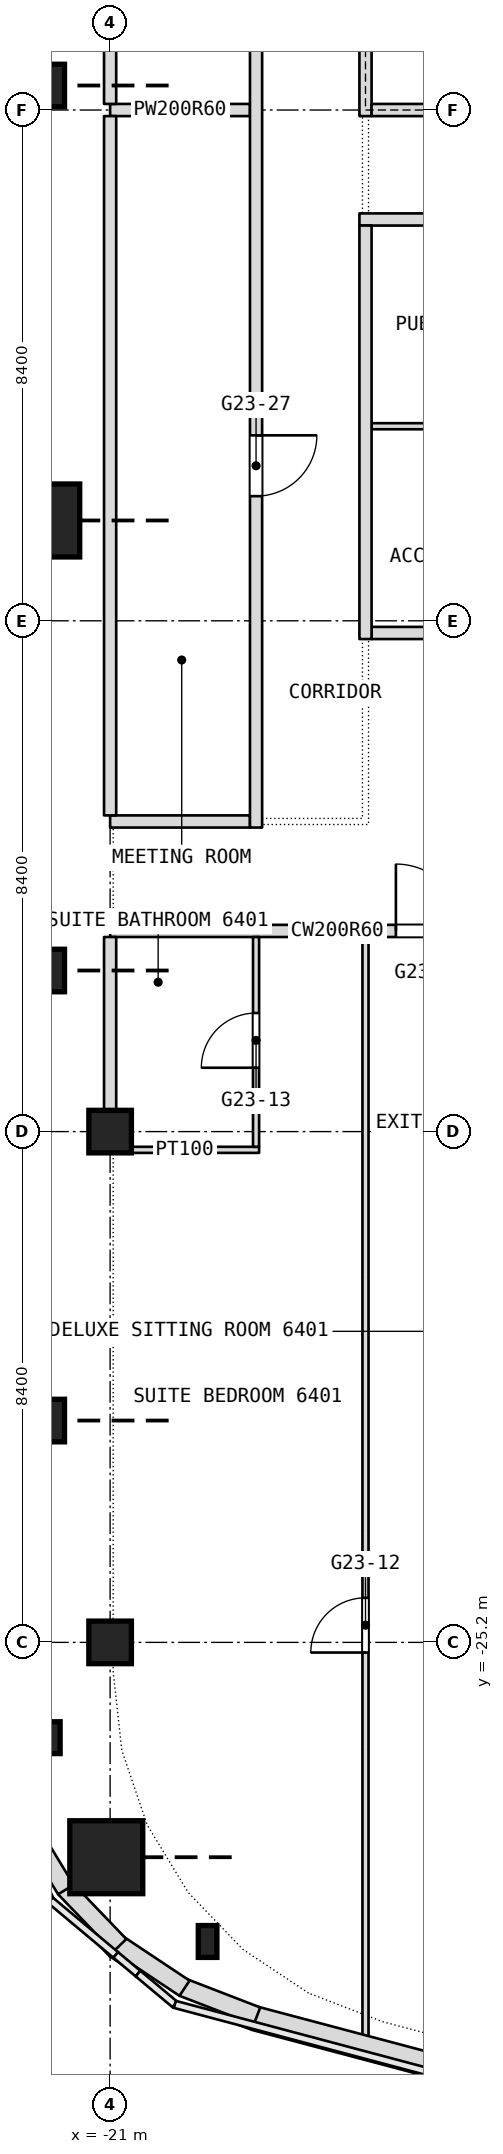
"""IFC4 building model, lengths in metres.
Left out: names, types, materials, properties, quantities, classifications, styles, units other than length and angle.
Written with IfcOpenShell. Run it as: python <this file> out.ifc"""

import sys

from ifc_helpers import new_model, si_unit, direction, frame, frame_2d, origin, origin_2d, place, context, subcontext, project, spatial, rectangle, i_section, extrude, element, fill, save


model = new_model("IFC4")
c1 = context("Model", 3, precision=1e-05, world=origin(), true_north=direction((0.0, 1.0)))
c2 = subcontext(c1, "Body", "Model", "MODEL_VIEW")
j1 = project(units=[si_unit("LENGTHUNIT", "METRE"), si_unit("PLANEANGLEUNIT", "RADIAN")], contexts=[c1])
p1 = place(None, origin())
s1 = spatial("IfcSite", under=j1, at=p1, CompositionType="ELEMENT")
p2 = place(p1, origin())
s2 = spatial("IfcBuilding", under=s1, at=p2, CompositionType="ELEMENT")
p3 = place(p2, frame((0.0, 0.0, 277.7)))
s3 = spatial("IfcBuildingStorey", under=s2, at=p3, CompositionType="ELEMENT", Elevation=277.7)
for number, where, z_axis, x_axis in (
    (1, (-21.0, -25.2, 0.0), (0.0, 0.0, 1.0), (1.0, 0.0, 0.0)),
    (2, (-21.0, -16.8, 0.0), (0.0, 0.0, 1.0), (1.0, 0.0, 0.0)),
):
    element("IfcColumn", number, at=place(p3, frame(where, z_axis=z_axis, x_axis=x_axis)), inside=s3, PredefinedType="COLUMN", context=c2, shape_type="SweptSolid", body=[
        extrude(rectangle(XDim=0.7, YDim=0.7, at=origin_2d()), origin(), (0.0, 0.0, 1.0), 3.34),
    ])
p4 = place(p3, frame((-19.397, -30.119, -0.26), z_axis=(0.0, 0.0, 1.0), x_axis=(1.0, 0.0, 0.0)))
e3 = element("IfcColumn", 3, at=p4, inside=s3, PredefinedType="COLUMN", context=c2, shape_type="SweptSolid", body=[
    extrude(i_section(OverallWidth=0.306, OverallDepth=0.524, WebThickness=0.024, FlangeThickness=0.04, FilletRadius=0.027, at=origin_2d()), origin(), (0.0, 0.0, 1.0), 3.2),
])
p5 = place(p3, frame((-21.058, -28.729, 0.0), z_axis=(0.0, 0.0, 1.0), x_axis=(1.0, 0.0, 0.0)))
e4 = element("IfcColumn", 4, at=p5, inside=s3, PredefinedType="COLUMN", context=c2, shape_type="SweptSolid", body=[
    extrude(i_section(OverallWidth=0.306, OverallDepth=0.524, WebThickness=0.024, FlangeThickness=0.04, FilletRadius=0.027, at=origin_2d()), origin(), (0.0, 0.0, 1.0), 2.94),
])
p6 = place(p3, frame((-21.975, -26.767, -0.26), z_axis=(0.0, 0.0, 1.0), x_axis=(1.0, 0.0, 0.0)))
e5 = element("IfcColumn", 5, at=p6, inside=s3, PredefinedType="COLUMN", context=c2, shape_type="SweptSolid", body=[
    extrude(i_section(OverallWidth=0.306, OverallDepth=0.524, WebThickness=0.024, FlangeThickness=0.04, FilletRadius=0.027, at=origin_2d()), origin(), (0.0, 0.0, 1.0), 3.2),
])
for number, where, z_axis, x_axis in (
    (6, (-22.1, -21.552, 0.0), (0.0, 0.0, 1.0), (1.0, 0.0, 0.0)),
    (7, (-22.1, -14.151, 0.0), (0.0, 0.0, 1.0), (1.0, 0.0, 0.0)),
    (8, (-22.1, -6.75, 0.0), (0.0, 0.0, 1.0), (1.0, 0.0, 0.0)),
    (9, (-22.1, 0.403, 0.0), (0.0, 0.0, 1.0), (1.0, 0.0, 0.0)),
):
    element("IfcColumn", number, at=place(p3, frame(where, z_axis=z_axis, x_axis=x_axis)), inside=s3, PredefinedType="COLUMN", context=c2, shape_type="SweptSolid", body=[
        extrude(i_section(OverallWidth=0.306, OverallDepth=0.524, WebThickness=0.024, FlangeThickness=0.04, FilletRadius=0.027, at=origin_2d()), origin(), (0.0, 0.0, 1.0), 2.94),
    ])
p7 = place(p3, frame((-21.0, -17.1, 0.0), z_axis=(0.0, 0.0, 1.0), x_axis=(1.0, 0.0, 0.0)))
e10 = element("IfcWall", 10, at=p7, inside=s3, PredefinedType="PARTITIONING", context=c2, shape_type="SweptSolid", body=[
    extrude(rectangle(XDim=2.45, YDim=0.1, at=frame_2d((1.225, 0.0))), origin(), (0.0, 0.0, 1.0), 3.34),
])
p8 = place(p3, frame((-21.0, -13.5, 0.0), z_axis=(0.0, 0.0, 1.0), x_axis=(1.0, 0.0, 0.0)))
e11 = element("IfcWall", 11, at=p8, inside=s3, PredefinedType="PARTITIONING", context=c2, shape_type="SweptSolid", body=[
    extrude(rectangle(XDim=6.1, YDim=0.2, at=frame_2d((3.05, 0.0))), origin(), (0.0, 0.0, 1.0), 3.34),
])
p9 = place(p8, frame((4.7, 0.0, 0.0)))
e12 = element("IfcOpeningElement", 12, at=p9, cuts=e11, PredefinedType="OPENING", context=c2, shape_type="SweptSolid", body=[
    extrude(rectangle(XDim=1.1, YDim=2.1, at=frame_2d((0.55, 1.05))), frame((0.0, 0.1, 0.0), z_axis=(0.0, -1.0, 0.0), x_axis=(1.0, 0.0, 0.0)), (0.0, 0.0, 1.0), 0.2),
])
p10 = place(p3, frame((-21.0, -11.7, 0.0), z_axis=(0.0, 0.0, 1.0), x_axis=(1.0, 0.0, 0.0)))
e13 = element("IfcWall", 13, at=p10, inside=s3, PredefinedType="PARTITIONING", context=c2, shape_type="SweptSolid", body=[
    extrude(rectangle(XDim=2.3, YDim=0.2, at=frame_2d((1.15, 0.0))), origin(), (0.0, 0.0, 1.0), 3.34),
])
p11 = place(p3, frame((-16.7, -8.6, 0.0), z_axis=(0.0, 0.0, 1.0), x_axis=(1.0, 0.0, 0.0)))
e14 = element("IfcWall", 14, at=p11, inside=s3, PredefinedType="PARTITIONING", context=c2, shape_type="SweptSolid", body=[
    extrude(rectangle(XDim=8.4, YDim=0.2, at=frame_2d((4.2, 0.0))), origin(), (0.0, 0.0, 1.0), 3.34),
])
p12 = place(p3, frame((-16.7, -5.2, 0.0), z_axis=(0.0, 0.0, 1.0), x_axis=(1.0, 0.0, 0.0)))
e15 = element("IfcWall", 15, at=p12, inside=s3, PredefinedType="PARTITIONING", context=c2, shape_type="SweptSolid", body=[
    extrude(rectangle(XDim=4.2, YDim=0.1, at=frame_2d((2.1, 0.0))), origin(), (0.0, 0.0, 1.0), 3.34),
])
p13 = place(p12, frame((1.55, 0.0, 0.0)))
e16 = element("IfcOpeningElement", 16, at=p13, cuts=e15, PredefinedType="OPENING", context=c2, shape_type="SweptSolid", body=[
    extrude(rectangle(XDim=0.9, YDim=2.1, at=frame_2d((0.45, 1.05))), frame((0.0, 0.05, 0.0), z_axis=(0.0, -1.0, 0.0), x_axis=(1.0, 0.0, 0.0)), (0.0, 0.0, 1.0), 0.1),
])
p14 = place(p3, frame((-16.9, -1.8, 0.0), z_axis=(0.0, 0.0, 1.0), x_axis=(1.0, 0.0, 0.0)))
e17 = element("IfcWall", 17, at=p14, inside=s3, PredefinedType="PARTITIONING", context=c2, shape_type="SweptSolid", body=[
    extrude(rectangle(XDim=33.8, YDim=0.2, at=frame_2d((16.9, 0.0))), origin(), (0.0, 0.0, 1.0), 3.34),
])
p15 = place(p14, frame((1.7, 0.0, 0.0)))
e18 = element("IfcOpeningElement", 18, at=p15, cuts=e17, PredefinedType="OPENING", context=c2, shape_type="SweptSolid", body=[
    extrude(rectangle(XDim=1.0, YDim=2.1, at=frame_2d((0.5, 1.05))), frame((0.0, 0.1, 0.0), z_axis=(0.0, -1.0, 0.0), x_axis=(1.0, 0.0, 0.0)), (0.0, 0.0, 1.0), 0.2),
])
p16 = place(p14, frame((5.9, 0.0, 0.0)))
e19 = element("IfcOpeningElement", 19, at=p16, cuts=e17, PredefinedType="OPENING", context=c2, shape_type="SweptSolid", body=[
    extrude(rectangle(XDim=1.0, YDim=2.1, at=frame_2d((0.5, 1.05))), frame((0.0, 0.1, 0.0), z_axis=(0.0, -1.0, 0.0), x_axis=(1.0, 0.0, 0.0)), (0.0, 0.0, 1.0), 0.2),
])
p17 = place(p14, frame((10.1, 0.0, 0.0)))
e20 = element("IfcOpeningElement", 20, at=p17, cuts=e17, PredefinedType="OPENING", context=c2, shape_type="SweptSolid", body=[
    extrude(rectangle(XDim=1.0, YDim=2.1, at=frame_2d((0.5, 1.05))), frame((0.0, 0.1, 0.0), z_axis=(0.0, -1.0, 0.0), x_axis=(1.0, 0.0, 0.0)), (0.0, 0.0, 1.0), 0.2),
])
p18 = place(p14, frame((16.0, 0.0, 0.0)))
e21 = element("IfcOpeningElement", 21, at=p18, cuts=e17, PredefinedType="OPENING", context=c2, shape_type="SweptSolid", body=[
    extrude(rectangle(XDim=1.8, YDim=2.1, at=frame_2d((0.9, 1.05))), frame((0.0, 0.1, 0.0), z_axis=(0.0, -1.0, 0.0), x_axis=(1.0, 0.0, 0.0)), (0.0, 0.0, 1.0), 0.2),
])
p19 = place(p14, frame((22.7, 0.0, 0.0)))
e22 = element("IfcOpeningElement", 22, at=p19, cuts=e17, PredefinedType="OPENING", context=c2, shape_type="SweptSolid", body=[
    extrude(rectangle(XDim=1.0, YDim=2.1, at=frame_2d((0.5, 1.05))), frame((0.0, 0.1, 0.0), z_axis=(0.0, -1.0, 0.0), x_axis=(1.0, 0.0, 0.0)), (0.0, 0.0, 1.0), 0.2),
])
p20 = place(p14, frame((26.9, 0.0, 0.0)))
e23 = element("IfcOpeningElement", 23, at=p20, cuts=e17, PredefinedType="OPENING", context=c2, shape_type="SweptSolid", body=[
    extrude(rectangle(XDim=1.0, YDim=2.1, at=frame_2d((0.5, 1.05))), frame((0.0, 0.1, 0.0), z_axis=(0.0, -1.0, 0.0), x_axis=(1.0, 0.0, 0.0)), (0.0, 0.0, 1.0), 0.2),
])
p21 = place(p14, frame((31.1, 0.0, 0.0)))
e24 = element("IfcOpeningElement", 24, at=p21, cuts=e17, PredefinedType="OPENING", context=c2, shape_type="SweptSolid", body=[
    extrude(rectangle(XDim=1.0, YDim=2.1, at=frame_2d((0.5, 1.05))), frame((0.0, 0.1, 0.0), z_axis=(0.0, -1.0, 0.0), x_axis=(1.0, 0.0, 0.0)), (0.0, 0.0, 1.0), 0.2),
])
p22 = place(p3, frame((-21.0, 0.0, 0.0), z_axis=(0.0, 0.0, 1.0), x_axis=(1.0, 0.0, 0.0)))
e25 = element("IfcWall", 25, at=p22, inside=s3, PredefinedType="PARTITIONING", context=c2, shape_type="SweptSolid", body=[
    extrude(rectangle(XDim=2.3, YDim=0.2, at=frame_2d((1.15, 0.0))), origin(), (0.0, 0.0, 1.0), 2.94),
])
p23 = place(p3, frame((-16.8, -31.957, 0.0), z_axis=(0.0, 0.0, 1.0), x_axis=(0.0, 1.0, 0.0)))
e26 = element("IfcWall", 26, at=p23, inside=s3, PredefinedType="PARTITIONING", context=c2, shape_type="SweptSolid", body=[
    extrude(rectangle(XDim=18.357, YDim=0.1, at=frame_2d((9.178, 0.0))), origin(), (0.0, 0.0, 1.0), 3.34),
])
p24 = place(p23, frame((6.59, 0.0, 0.0)))
e27 = element("IfcOpeningElement", 27, at=p24, cuts=e26, PredefinedType="OPENING", context=c2, shape_type="SweptSolid", body=[
    extrude(rectangle(XDim=0.9, YDim=2.1, at=frame_2d((0.45, 1.05))), frame((0.0, 0.05, 0.0), z_axis=(0.0, -1.0, 0.0), x_axis=(1.0, 0.0, 0.0)), (0.0, 0.0, 1.0), 0.1),
])
p25 = place(p3, frame((-16.8, -8.7, 0.0), z_axis=(0.0, 0.0, 1.0), x_axis=(0.0, 1.0, 0.0)))
e28 = element("IfcWall", 28, at=p25, inside=s3, PredefinedType="PARTITIONING", context=c2, shape_type="SweptSolid", body=[
    extrude(rectangle(XDim=6.8, YDim=0.2, at=frame_2d((3.4, 0.0))), origin(), (0.0, 0.0, 1.0), 3.34),
])
p26 = place(p3, frame((-18.6, -17.05, 0.0), z_axis=(0.0, 0.0, 1.0), x_axis=(0.0, 1.0, 0.0)))
e29 = element("IfcWall", 29, at=p26, inside=s3, PredefinedType="PARTITIONING", context=c2, shape_type="SweptSolid", body=[
    extrude(rectangle(XDim=3.45, YDim=0.1, at=frame_2d((1.725, 0.0))), origin(), (0.0, 0.0, 1.0), 3.34),
])
p27 = place(p26, frame((1.3, 0.0, 0.0)))
e30 = element("IfcOpeningElement", 30, at=p27, cuts=e29, PredefinedType="OPENING", context=c2, shape_type="SweptSolid", body=[
    extrude(rectangle(XDim=0.9, YDim=2.1, at=frame_2d((0.45, 1.05))), frame((0.0, 0.05, 0.0), z_axis=(0.0, -1.0, 0.0), x_axis=(1.0, 0.0, 0.0)), (0.0, 0.0, 1.0), 0.1),
])
p28 = place(p3, frame((-18.6, -11.8, 0.0), z_axis=(0.0, 0.0, 1.0), x_axis=(0.0, 1.0, 0.0)))
e31 = element("IfcWall", 31, at=p28, inside=s3, PredefinedType="PARTITIONING", context=c2, shape_type="SweptSolid", body=[
    extrude(rectangle(XDim=27.336, YDim=0.2, at=frame_2d((13.668, 0.0))), origin(), (0.0, 0.0, 1.0), 3.34),
])
p29 = place(p28, frame((18.668, 0.0, 0.0)))
e32 = element("IfcOpeningElement", 32, at=p29, cuts=e31, PredefinedType="OPENING", context=c2, shape_type="SweptSolid", body=[
    extrude(rectangle(XDim=1.8, YDim=2.1, at=frame_2d((0.9, 1.05))), frame((0.0, 0.1, 0.0), z_axis=(0.0, -1.0, 0.0), x_axis=(1.0, 0.0, 0.0)), (0.0, 0.0, 1.0), 0.2),
])
p30 = place(p28, frame((5.45, 0.0, 0.0)))
e33 = element("IfcOpeningElement", 33, at=p30, cuts=e31, PredefinedType="OPENING", context=c2, shape_type="SweptSolid", body=[
    extrude(rectangle(XDim=1.0, YDim=2.1, at=frame_2d((0.5, 1.05))), frame((0.0, 0.1, 0.0), z_axis=(0.0, -1.0, 0.0), x_axis=(1.0, 0.0, 0.0)), (0.0, 0.0, 1.0), 0.2),
])
p31 = place(p3, frame((-21.0, -17.05, 0.0), z_axis=(0.0, 0.0, 1.0), x_axis=(0.0, 1.0, 0.0)))
e34 = element("IfcWall", 34, at=p31, inside=s3, PredefinedType="PARTITIONING", context=c2, shape_type="SweptSolid", body=[
    extrude(rectangle(XDim=3.45, YDim=0.2, at=frame_2d((1.725, 0.0))), origin(), (0.0, 0.0, 1.0), 3.34),
])
p32 = place(p3, frame((-21.0, -11.6, 0.0), z_axis=(0.0, 0.0, 1.0), x_axis=(0.0, 1.0, 0.0)))
e35 = element("IfcWall", 35, at=p32, inside=s3, PredefinedType="PARTITIONING", context=c2, shape_type="SweptSolid", body=[
    extrude(rectangle(XDim=11.5, YDim=0.2, at=frame_2d((5.75, 0.0))), origin(), (0.0, 0.0, 1.0), 3.34),
])
p33 = place(p3, frame((-21.0, 0.1, 0.0), z_axis=(0.0, 0.0, 1.0), x_axis=(0.0, 1.0, 0.0)))
e36 = element("IfcWall", 36, at=p33, inside=s3, PredefinedType="PARTITIONING", context=c2, shape_type="SweptSolid", body=[
    extrude(rectangle(XDim=10.602, YDim=0.2, at=frame_2d((5.301, 0.0))), origin(), (0.0, 0.0, 1.0), 3.34),
])
p34 = place(p3, frame((-8.865, -33.921, 3.6), z_axis=(0.0, 0.0, 1.0), x_axis=(-0.966564868529, 0.256422220031, 0.0)))
e37 = element("IfcWall", 37, at=p34, inside=s3, PredefinedType="PARAPET", context=c2, shape_type="SweptSolid", body=[
    extrude(rectangle(XDim=10.071, YDim=0.3, at=frame_2d((5.036, 0.0))), origin(), (0.0, 0.0, 1.0), 1.1),
])
p35 = place(p3, frame((-18.585, -31.344, 3.6), z_axis=(0.0, 0.0, 1.0), x_axis=(-0.932786730883, 0.360428792813, 0.0)))
e38 = element("IfcWall", 38, at=p35, inside=s3, PredefinedType="PARAPET", context=c2, shape_type="SweptSolid", body=[
    extrude(rectangle(XDim=1.309, YDim=0.3, at=frame_2d((0.654, 0.0))), origin(), (0.0, 0.0, 1.0), 1.1),
])
p36 = place(p3, frame((-19.776, -30.887, 3.6), z_axis=(0.0, 0.0, 1.0), x_axis=(-0.832566414073, 0.55392523517, 0.0)))
e39 = element("IfcWall", 39, at=p36, inside=s3, PredefinedType="PARAPET", context=c2, shape_type="SweptSolid", body=[
    extrude(rectangle(XDim=1.309, YDim=0.3, at=frame_2d((0.655, 0.0))), origin(), (0.0, 0.0, 1.0), 1.1),
])
p37 = place(p3, frame((-20.841, -30.183, 3.6), z_axis=(0.0, 0.0, 1.0), x_axis=(-0.692407566653, 0.721506591544, 0.0)))
e40 = element("IfcWall", 40, at=p37, inside=s3, PredefinedType="PARAPET", context=c2, shape_type="SweptSolid", body=[
    extrude(rectangle(XDim=1.309, YDim=0.3, at=frame_2d((0.654, 0.0))), origin(), (0.0, 0.0, 1.0), 1.1),
])
p38 = place(p3, frame((-21.727, -29.265, 3.6), z_axis=(0.0, 0.0, 1.0), x_axis=(-0.519751696049, 0.854317373377, 0.0)))
e41 = element("IfcWall", 41, at=p38, inside=s3, PredefinedType="PARAPET", context=c2, shape_type="SweptSolid", body=[
    extrude(rectangle(XDim=1.309, YDim=0.3, at=frame_2d((0.655, 0.0))), origin(), (0.0, 0.0, 1.0), 1.1),
])
p39 = place(p3, frame((-16.8, -0.1, 0.0), z_axis=(0.0, 0.0, 1.0), x_axis=(0.0, 1.0, 0.0)))
e42 = element("IfcWall", 42, at=p39, inside=s3, PredefinedType="PARTITIONING", context=c2, shape_type="SweptSolid", body=[
    extrude(rectangle(XDim=17.0, YDim=0.2, at=frame_2d((8.5, 0.0))), origin(), (0.0, 0.0, 1.0), 3.34),
])
p40 = place(p39, frame((2.2, 0.0, 0.0)))
e43 = element("IfcOpeningElement", 43, at=p40, cuts=e42, PredefinedType="OPENING", context=c2, shape_type="SweptSolid", body=[
    extrude(rectangle(XDim=1.8, YDim=2.1, at=frame_2d((0.9, 1.05))), frame((0.0, 0.1, 0.0), z_axis=(0.0, -1.0, 0.0), x_axis=(1.0, 0.0, 0.0)), (0.0, 0.0, 1.0), 0.2),
])
p41 = place(p39, frame((10.6, 0.0, 0.0)))
e44 = element("IfcOpeningElement", 44, at=p41, cuts=e42, PredefinedType="OPENING", context=c2, shape_type="SweptSolid", body=[
    extrude(rectangle(XDim=1.8, YDim=2.1, at=frame_2d((0.9, 1.05))), frame((0.0, 0.1, 0.0), z_axis=(0.0, -1.0, 0.0), x_axis=(1.0, 0.0, 0.0)), (0.0, 0.0, 1.0), 0.2),
])
p42 = place(p3, frame((-16.7, 0.0, 0.0), z_axis=(0.0, 0.0, 1.0), x_axis=(1.0, 0.0, 0.0)))
e45 = element("IfcWall", 45, at=p42, inside=s3, PredefinedType="PARTITIONING", context=c2, shape_type="SweptSolid", body=[
    extrude(rectangle(XDim=5.0, YDim=0.2, at=frame_2d((2.5, 0.0))), origin(), (0.0, 0.0, 1.0), 3.0),
])
p43 = place(p9, origin())
e46 = element("IfcDoor", 46, at=p43, inside=s3, OperationType="SINGLE_SWING_RIGHT", PredefinedType="DOOR", context=c2, shape_type="SweptSolid", body=[
    extrude(rectangle(XDim=1.1, YDim=2.1, at=frame_2d((0.55, 1.05))), frame((0.0, 0.025, 0.0), z_axis=(0.0, -1.0, 0.0), x_axis=(1.0, 0.0, 0.0)), (0.0, 0.0, 1.0), 0.05),
])
fill(e12, e46)
p44 = place(p24, origin())
e47 = element("IfcDoor", 47, at=p44, inside=s3, OperationType="SINGLE_SWING_LEFT", PredefinedType="DOOR", context=c2, shape_type="SweptSolid", body=[
    extrude(rectangle(XDim=0.9, YDim=2.1, at=frame_2d((0.45, 1.05))), frame((0.0, 0.025, 0.0), z_axis=(0.0, -1.0, 0.0), x_axis=(1.0, 0.0, 0.0)), (0.0, 0.0, 1.0), 0.05),
])
fill(e27, e47)
p45 = place(p27, origin())
e48 = element("IfcDoor", 48, at=p45, inside=s3, OperationType="SINGLE_SWING_RIGHT", PredefinedType="DOOR", context=c2, shape_type="SweptSolid", body=[
    extrude(rectangle(XDim=0.9, YDim=2.1, at=frame_2d((0.45, 1.05))), frame((0.0, 0.025, 0.0), z_axis=(0.0, -1.0, 0.0), x_axis=(1.0, 0.0, 0.0)), (0.0, 0.0, 1.0), 0.05),
])
fill(e30, e48)
p46 = place(p30, origin())
e49 = element("IfcDoor", 49, at=p46, inside=s3, OperationType="SINGLE_SWING_LEFT", PredefinedType="DOOR", context=c2, shape_type="SweptSolid", body=[
    extrude(rectangle(XDim=1.0, YDim=2.1, at=frame_2d((0.5, 1.05))), frame((0.0, 0.025, 0.0), z_axis=(0.0, -1.0, 0.0), x_axis=(1.0, 0.0, 0.0)), (0.0, 0.0, 1.0), 0.05),
])
fill(e33, e49)
save(model, sys.argv[1])
